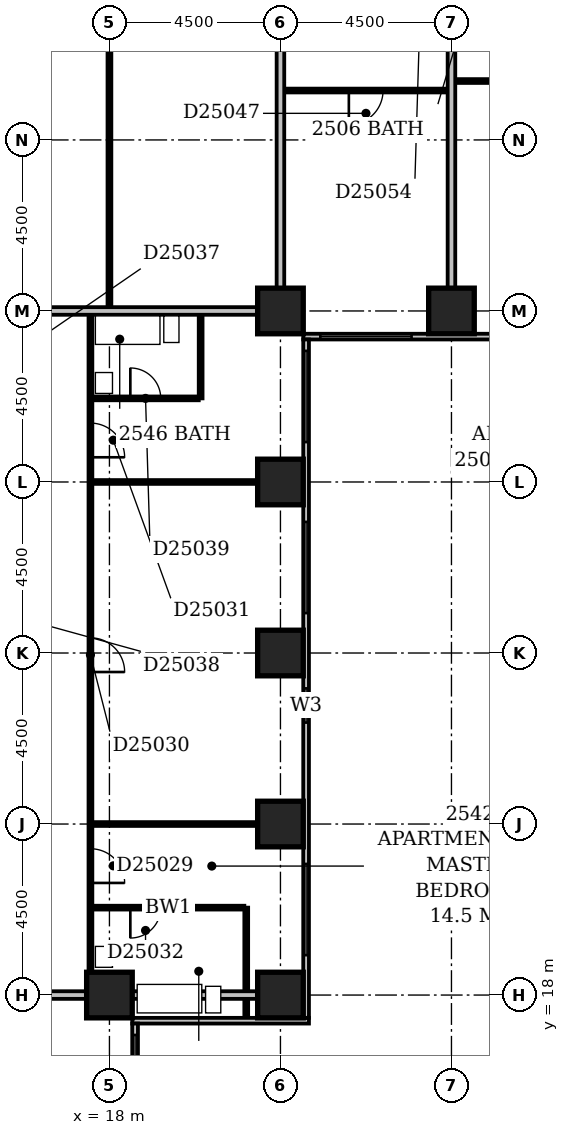
"""IFC4 building model, lengths in metres.
Left out: names, types, materials, properties, quantities, classifications, styles, units other than length and angle.
Written with IfcOpenShell. Run it as: python <this file> out.ifc"""

import sys

from ifc_helpers import new_model, si_unit, direction, frame, frame_2d, origin, origin_2d, place, context, subcontext, project, spatial, rectangle, extrude, element, fill, save


model = new_model("IFC4")
c1 = context("Model", 3, precision=1e-05, world=origin(), true_north=direction((0.0, 1.0)))
c2 = subcontext(c1, "Body", "Model", "MODEL_VIEW")
j1 = project(units=[si_unit("LENGTHUNIT", "METRE"), si_unit("PLANEANGLEUNIT", "RADIAN")], contexts=[c1])
p1 = place(None, origin())
s1 = spatial("IfcSite", under=j1, at=p1, CompositionType="ELEMENT")
p2 = place(p1, origin())
s2 = spatial("IfcBuilding", under=s1, at=p2, CompositionType="ELEMENT")
p3 = place(p2, frame((0.0, 0.0, 101.0)))
s3 = spatial("IfcBuildingStorey", under=s2, at=p3, CompositionType="ELEMENT", Elevation=101.0)
for number, where, z_axis, x_axis in (
    (1, (18.0, 18.0, -0.3), (0.0, 0.0, 1.0), (1.0, 0.0, 0.0)),
    (2, (22.5, 18.0, -0.3), (0.0, 0.0, 1.0), (1.0, 0.0, 0.0)),
    (3, (22.5, 22.5, -0.3), (0.0, 0.0, 1.0), (1.0, 0.0, 0.0)),
    (4, (22.5, 27.0, -0.3), (0.0, 0.0, 1.0), (1.0, 0.0, 0.0)),
    (5, (22.5, 31.5, -0.3), (0.0, 0.0, 1.0), (1.0, 0.0, 0.0)),
    (6, (22.5, 36.0, -0.3), (0.0, 0.0, 1.0), (1.0, 0.0, 0.0)),
    (7, (27.0, 36.0, -0.3), (0.0, 0.0, 1.0), (1.0, 0.0, 0.0)),
):
    element("IfcColumn", number, at=place(p3, frame(where, z_axis=z_axis, x_axis=x_axis)), inside=s3, PredefinedType="COLUMN", context=c2, shape_type="SweptSolid", body=[
        extrude(rectangle(XDim=1.2, YDim=1.2, at=origin_2d()), origin(), (0.0, 0.0, 1.0), 3.6),
    ])
p4 = place(p3, frame((18.675, 8.4, 0.0), z_axis=(0.0, 0.0, 1.0), x_axis=(0.0, 1.0, 0.0)))
e8 = element("IfcWall", 8, at=p4, inside=s3, PredefinedType="STANDARD", context=c2, shape_type="SweptSolid", body=[
    extrude(rectangle(XDim=8.85, YDim=0.15, at=frame_2d((4.425, 0.0))), origin(), (0.0, 0.0, 1.0), 2.7),
])
p5 = place(p4, frame((1.535, 0.0, 0.6)))
e9 = element("IfcOpeningElement", 9, at=p5, cuts=e8, PredefinedType="OPENING", context=c2, shape_type="SweptSolid", body=[
    extrude(rectangle(XDim=1.2, YDim=1.8, at=frame_2d((0.6, 0.9))), frame((0.0, 0.087, 0.0), z_axis=(0.0, -1.0, 0.0), x_axis=(1.0, 0.0, 0.0)), (0.0, 0.0, 1.0), 0.174),
])
p6 = place(p4, frame((6.15, 0.0, 0.6)))
e10 = element("IfcOpeningElement", 10, at=p6, cuts=e8, PredefinedType="OPENING", context=c2, shape_type="SweptSolid", body=[
    extrude(rectangle(XDim=2.4, YDim=1.8, at=frame_2d((1.2, 0.9))), frame((0.0, 0.087, 0.0), z_axis=(0.0, -1.0, 0.0), x_axis=(1.0, 0.0, 0.0)), (0.0, 0.0, 1.0), 0.174),
])
p7 = place(p3, frame((18.6, 17.325, 0.0), z_axis=(0.0, 0.0, 1.0), x_axis=(1.0, 0.0, 0.0)))
e11 = element("IfcWall", 11, at=p7, inside=s3, PredefinedType="STANDARD", context=c2, shape_type="SweptSolid", body=[
    extrude(rectangle(XDim=4.65, YDim=0.15, at=frame_2d((2.325, 0.0))), origin(), (0.0, 0.0, 1.0), 2.7),
])
p8 = place(p3, frame((23.175, 17.4, 0.0), z_axis=(0.0, 0.0, 1.0), x_axis=(0.0, 1.0, 0.0)))
e12 = element("IfcWall", 12, at=p8, inside=s3, PredefinedType="STANDARD", context=c2, shape_type="SweptSolid", body=[
    extrude(rectangle(XDim=17.85, YDim=0.15, at=frame_2d((8.925, 0.0))), origin(), (0.0, 0.0, 1.0), 2.7),
])
p9 = place(p8, frame((1.65, 0.0, 0.6)))
e13 = element("IfcOpeningElement", 13, at=p9, cuts=e12, PredefinedType="OPENING", context=c2, shape_type="SweptSolid", body=[
    extrude(rectangle(XDim=2.4, YDim=1.8, at=frame_2d((1.2, 0.9))), frame((0.0, 0.087, 0.0), z_axis=(0.0, -1.0, 0.0), x_axis=(1.0, 0.0, 0.0)), (0.0, 0.0, 1.0), 0.174),
])
p10 = place(p8, frame((7.769, 0.0, 0.6)))
e14 = element("IfcOpeningElement", 14, at=p10, cuts=e12, PredefinedType="OPENING", context=c2, shape_type="SweptSolid", body=[
    extrude(rectangle(XDim=0.9, YDim=1.8, at=frame_2d((0.45, 0.9))), frame((0.0, 0.087, 0.0), z_axis=(0.0, -1.0, 0.0), x_axis=(1.0, 0.0, 0.0)), (0.0, 0.0, 1.0), 0.174),
])
p11 = place(p8, frame((10.65, 0.0, 0.6)))
e15 = element("IfcOpeningElement", 15, at=p11, cuts=e12, PredefinedType="OPENING", context=c2, shape_type="SweptSolid", body=[
    extrude(rectangle(XDim=2.4, YDim=1.8, at=frame_2d((1.2, 0.9))), frame((0.0, 0.087, 0.0), z_axis=(0.0, -1.0, 0.0), x_axis=(1.0, 0.0, 0.0)), (0.0, 0.0, 1.0), 0.174),
])
p12 = place(p8, frame((15.15, 0.0, 0.6)))
e16 = element("IfcOpeningElement", 16, at=p12, cuts=e12, PredefinedType="OPENING", context=c2, shape_type="SweptSolid", body=[
    extrude(rectangle(XDim=2.4, YDim=1.8, at=frame_2d((1.2, 0.9))), frame((0.0, 0.087, 0.0), z_axis=(0.0, -1.0, 0.0), x_axis=(1.0, 0.0, 0.0)), (0.0, 0.0, 1.0), 0.174),
])
p13 = place(p3, frame((23.1, 35.325, 0.0), z_axis=(0.0, 0.0, 1.0), x_axis=(1.0, 0.0, 0.0)))
e17 = element("IfcWall", 17, at=p13, inside=s3, PredefinedType="STANDARD", context=c2, shape_type="SweptSolid", body=[
    extrude(rectangle(XDim=45.15, YDim=0.15, at=frame_2d((22.575, 0.0))), origin(), (0.0, 0.0, 1.0), 2.7),
])
p14 = place(p13, frame((0.45, 0.0, 0.6)))
e18 = element("IfcOpeningElement", 18, at=p14, cuts=e17, PredefinedType="OPENING", context=c2, shape_type="SweptSolid", body=[
    extrude(rectangle(XDim=2.4, YDim=1.8, at=frame_2d((1.2, 0.9))), frame((0.0, 0.087, 0.0), z_axis=(0.0, -1.0, 0.0), x_axis=(1.0, 0.0, 0.0)), (0.0, 0.0, 1.0), 0.174),
])
p15 = place(p13, frame((5.728, 0.0, 0.6)))
e19 = element("IfcOpeningElement", 19, at=p15, cuts=e17, PredefinedType="OPENING", context=c2, shape_type="SweptSolid", body=[
    extrude(rectangle(XDim=1.8, YDim=1.8, at=frame_2d((0.9, 0.9))), frame((0.0, 0.087, 0.0), z_axis=(0.0, -1.0, 0.0), x_axis=(1.0, 0.0, 0.0)), (0.0, 0.0, 1.0), 0.174),
])
p16 = place(p13, frame((9.45, 0.0, 0.6)))
e20 = element("IfcOpeningElement", 20, at=p16, cuts=e17, PredefinedType="OPENING", context=c2, shape_type="SweptSolid", body=[
    extrude(rectangle(XDim=2.4, YDim=1.8, at=frame_2d((1.2, 0.9))), frame((0.0, 0.087, 0.0), z_axis=(0.0, -1.0, 0.0), x_axis=(1.0, 0.0, 0.0)), (0.0, 0.0, 1.0), 0.174),
])
p17 = place(p13, frame((13.95, 0.0, 0.6)))
e21 = element("IfcOpeningElement", 21, at=p17, cuts=e17, PredefinedType="OPENING", context=c2, shape_type="SweptSolid", body=[
    extrude(rectangle(XDim=2.4, YDim=1.8, at=frame_2d((1.2, 0.9))), frame((0.0, 0.087, 0.0), z_axis=(0.0, -1.0, 0.0), x_axis=(1.0, 0.0, 0.0)), (0.0, 0.0, 1.0), 0.174),
])
p18 = place(p13, frame((18.276, 0.0, 0.6)))
e22 = element("IfcOpeningElement", 22, at=p18, cuts=e17, PredefinedType="OPENING", context=c2, shape_type="SweptSolid", body=[
    extrude(rectangle(XDim=2.4, YDim=1.8, at=frame_2d((1.2, 0.9))), frame((0.0, 0.087, 0.0), z_axis=(0.0, -1.0, 0.0), x_axis=(1.0, 0.0, 0.0)), (0.0, 0.0, 1.0), 0.174),
])
p19 = place(p13, frame((22.95, 0.0, 0.6)))
e23 = element("IfcOpeningElement", 23, at=p19, cuts=e17, PredefinedType="OPENING", context=c2, shape_type="SweptSolid", body=[
    extrude(rectangle(XDim=2.4, YDim=1.8, at=frame_2d((1.2, 0.9))), frame((0.0, 0.087, 0.0), z_axis=(0.0, -1.0, 0.0), x_axis=(1.0, 0.0, 0.0)), (0.0, 0.0, 1.0), 0.174),
])
p20 = place(p13, frame((27.45, 0.0, 0.6)))
e24 = element("IfcOpeningElement", 24, at=p20, cuts=e17, PredefinedType="OPENING", context=c2, shape_type="SweptSolid", body=[
    extrude(rectangle(XDim=2.4, YDim=1.8, at=frame_2d((1.2, 0.9))), frame((0.0, 0.087, 0.0), z_axis=(0.0, -1.0, 0.0), x_axis=(1.0, 0.0, 0.0)), (0.0, 0.0, 1.0), 0.174),
])
p21 = place(p13, frame((33.921, 0.0, 0.6)))
e25 = element("IfcOpeningElement", 25, at=p21, cuts=e17, PredefinedType="OPENING", context=c2, shape_type="SweptSolid", body=[
    extrude(rectangle(XDim=0.6, YDim=1.8, at=frame_2d((0.3, 0.9))), frame((0.0, 0.087, 0.0), z_axis=(0.0, -1.0, 0.0), x_axis=(1.0, 0.0, 0.0)), (0.0, 0.0, 1.0), 0.174),
])
p22 = place(p13, frame((36.45, 0.0, 0.6)))
e26 = element("IfcOpeningElement", 26, at=p22, cuts=e17, PredefinedType="OPENING", context=c2, shape_type="SweptSolid", body=[
    extrude(rectangle(XDim=2.4, YDim=1.8, at=frame_2d((1.2, 0.9))), frame((0.0, 0.087, 0.0), z_axis=(0.0, -1.0, 0.0), x_axis=(1.0, 0.0, 0.0)), (0.0, 0.0, 1.0), 0.174),
])
p23 = place(p13, frame((40.95, 0.0, 0.6)))
e27 = element("IfcOpeningElement", 27, at=p23, cuts=e17, PredefinedType="OPENING", context=c2, shape_type="SweptSolid", body=[
    extrude(rectangle(XDim=2.4, YDim=1.8, at=frame_2d((1.2, 0.9))), frame((0.0, 0.087, 0.0), z_axis=(0.0, -1.0, 0.0), x_axis=(1.0, 0.0, 0.0)), (0.0, 0.0, 1.0), 0.174),
])
p24 = place(p3, frame((21.6, 17.4, 0.0), z_axis=(0.0, 0.0, 1.0), x_axis=(0.0, 1.0, 0.0)))
e28 = element("IfcWall", 28, at=p24, inside=s3, PredefinedType="PLUMBINGWALL", context=c2, shape_type="SweptSolid", body=[
    extrude(rectangle(XDim=2.9, YDim=0.1, at=frame_2d((1.45, 0.0))), origin(), (0.0, 0.0, 1.0), 3.3),
])
p25 = place(p3, frame((9.1, 18.0, 0.0), z_axis=(0.0, 0.0, 1.0), x_axis=(1.0, 0.0, 0.0)))
e29 = element("IfcWall", 29, at=p25, inside=s3, PredefinedType="PARTITIONING", context=c2, shape_type="SweptSolid", body=[
    extrude(rectangle(XDim=8.3, YDim=0.2, at=frame_2d((4.15, 0.0))), origin(), (0.0, 0.0, 1.0), 2.6),
])
p26 = place(p3, frame((18.6, 18.0, 0.0), z_axis=(0.0, 0.0, 1.0), x_axis=(1.0, 0.0, 0.0)))
e30 = element("IfcWall", 30, at=p26, inside=s3, PredefinedType="PARTITIONING", context=c2, shape_type="SweptSolid", body=[
    extrude(rectangle(XDim=3.3, YDim=0.2, at=frame_2d((1.65, 0.0))), origin(), (0.0, 0.0, 1.0), 2.7),
])
p27 = place(p3, frame((17.5, 18.1, 0.0), z_axis=(0.0, 0.0, 1.0), x_axis=(0.0, 1.0, 0.0)))
e31 = element("IfcWall", 31, at=p27, inside=s3, PredefinedType="PARTITIONING", context=c2, shape_type="SweptSolid", body=[
    extrude(rectangle(XDim=17.8, YDim=0.1, at=frame_2d((8.9, 0.0))), origin(), (0.0, 0.0, 1.0), 3.3),
])
p28 = place(p27, frame((2.85, 0.0, 0.0)))
e32 = element("IfcOpeningElement", 32, at=p28, cuts=e31, PredefinedType="OPENING", context=c2, shape_type="SweptSolid", body=[
    extrude(rectangle(XDim=0.9, YDim=2.1, at=frame_2d((0.45, 1.05))), frame((0.0, 0.062, 0.0), z_axis=(0.0, -1.0, 0.0), x_axis=(1.0, 0.0, 0.0)), (0.0, 0.0, 1.0), 0.124),
])
p29 = place(p27, frame((8.4, 0.0, 0.0)))
e33 = element("IfcOpeningElement", 33, at=p29, cuts=e31, PredefinedType="OPENING", context=c2, shape_type="SweptSolid", body=[
    extrude(rectangle(XDim=0.9, YDim=2.1, at=frame_2d((0.45, 1.05))), frame((0.0, 0.062, 0.0), z_axis=(0.0, -1.0, 0.0), x_axis=(1.0, 0.0, 0.0)), (0.0, 0.0, 1.0), 0.124),
])
p30 = place(p27, frame((14.05, 0.0, 0.0)))
e34 = element("IfcOpeningElement", 34, at=p30, cuts=e31, PredefinedType="OPENING", context=c2, shape_type="SweptSolid", body=[
    extrude(rectangle(XDim=0.9, YDim=2.1, at=frame_2d((0.45, 1.05))), frame((0.0, 0.062, 0.0), z_axis=(0.0, -1.0, 0.0), x_axis=(1.0, 0.0, 0.0)), (0.0, 0.0, 1.0), 0.124),
])
p31 = place(p3, frame((17.55, 20.3, 0.0), z_axis=(0.0, 0.0, 1.0), x_axis=(1.0, 0.0, 0.0)))
e35 = element("IfcWall", 35, at=p31, inside=s3, PredefinedType="PLUMBINGWALL", context=c2, shape_type="SweptSolid", body=[
    extrude(rectangle(XDim=4.0, YDim=0.1, at=frame_2d((2.0, 0.0))), origin(), (0.0, 0.0, 1.0), 3.3),
])
p32 = place(p31, frame((1.0, 0.0, 0.0)))
e36 = element("IfcOpeningElement", 36, at=p32, cuts=e35, PredefinedType="OPENING", context=c2, shape_type="SweptSolid", body=[
    extrude(rectangle(XDim=0.8, YDim=2.1, at=frame_2d((0.4, 1.05))), frame((0.0, 0.062, 0.0), z_axis=(0.0, -1.0, 0.0), x_axis=(1.0, 0.0, 0.0)), (0.0, 0.0, 1.0), 0.124),
])
for number, where, z_axis, x_axis in (
    (37, (17.55, 22.5, 0.0), (0.0, 0.0, 1.0), (1.0, 0.0, 0.0)),
    (38, (17.55, 31.5, 0.0), (0.0, 0.0, 1.0), (1.0, 0.0, 0.0)),
):
    element("IfcWall", number, at=place(p3, frame(where, z_axis=z_axis, x_axis=x_axis)), inside=s3, PredefinedType="PARTITIONING", context=c2, shape_type="SweptSolid", body=[
        extrude(rectangle(XDim=4.35, YDim=0.1, at=frame_2d((2.175, 0.0))), origin(), (0.0, 0.0, 1.0), 3.3),
    ])
p33 = place(p3, frame((17.55, 33.7, 0.0), z_axis=(0.0, 0.0, 1.0), x_axis=(1.0, 0.0, 0.0)))
e39 = element("IfcWall", 39, at=p33, inside=s3, PredefinedType="PLUMBINGWALL", context=c2, shape_type="SweptSolid", body=[
    extrude(rectangle(XDim=2.8, YDim=0.1, at=frame_2d((1.4, 0.0))), origin(), (0.0, 0.0, 1.0), 3.3),
])
p34 = place(p33, frame((1.0, 0.0, 0.0)))
e40 = element("IfcOpeningElement", 40, at=p34, cuts=e39, PredefinedType="OPENING", context=c2, shape_type="SweptSolid", body=[
    extrude(rectangle(XDim=0.8, YDim=2.1, at=frame_2d((0.4, 1.05))), frame((0.0, 0.062, 0.0), z_axis=(0.0, -1.0, 0.0), x_axis=(1.0, 0.0, 0.0)), (0.0, 0.0, 1.0), 0.124),
])
p35 = place(p3, frame((20.4, 33.7, 0.0), z_axis=(0.0, 0.0, 1.0), x_axis=(0.0, 1.0, 0.0)))
e41 = element("IfcWall", 41, at=p35, inside=s3, PredefinedType="PLUMBINGWALL", context=c2, shape_type="SweptSolid", body=[
    extrude(rectangle(XDim=2.2, YDim=0.1, at=frame_2d((1.1, 0.0))), origin(), (0.0, 0.0, 1.0), 3.3),
])
p36 = place(p3, frame((9.1, 36.0, 0.0), z_axis=(0.0, 0.0, 1.0), x_axis=(1.0, 0.0, 0.0)))
e42 = element("IfcWall", 42, at=p36, inside=s3, PredefinedType="PARTITIONING", context=c2, shape_type="SweptSolid", body=[
    extrude(rectangle(XDim=12.8, YDim=0.2, at=frame_2d((6.4, 0.0))), origin(), (0.0, 0.0, 1.0), 2.4),
])
p37 = place(p3, frame((18.0, 36.1, 0.0), z_axis=(0.0, 0.0, 1.0), x_axis=(0.0, 1.0, 0.0)))
e43 = element("IfcWall", 43, at=p37, inside=s3, PredefinedType="PARTITIONING", context=c2, shape_type="SweptSolid", body=[
    extrude(rectangle(XDim=13.3, YDim=0.1, at=frame_2d((6.65, 0.0))), origin(), (0.0, 0.0, 1.0), 3.3),
])
p38 = place(p3, frame((22.5, 36.6, 0.0), z_axis=(0.0, 0.0, 1.0), x_axis=(0.0, 1.0, 0.0)))
e44 = element("IfcWall", 44, at=p38, inside=s3, PredefinedType="PARTITIONING", context=c2, shape_type="SweptSolid", body=[
    extrude(rectangle(XDim=12.8, YDim=0.2, at=frame_2d((6.4, 0.0))), origin(), (0.0, 0.0, 1.0), 3.3),
])
p39 = place(p3, frame((27.0, 36.6, 0.0), z_axis=(0.0, 0.0, 1.0), x_axis=(0.0, 1.0, 0.0)))
e45 = element("IfcWall", 45, at=p39, inside=s3, PredefinedType="PARTITIONING", context=c2, shape_type="SweptSolid", body=[
    extrude(rectangle(XDim=12.8, YDim=0.2, at=frame_2d((6.4, 0.0))), origin(), (0.0, 0.0, 1.0), 2.6),
])
p40 = place(p3, frame((22.6, 41.8, 0.0), z_axis=(0.0, 0.0, 1.0), x_axis=(1.0, 0.0, 0.0)))
e46 = element("IfcWall", 46, at=p40, inside=s3, PredefinedType="PARTITIONING", context=c2, shape_type="SweptSolid", body=[
    extrude(rectangle(XDim=4.3, YDim=0.1, at=frame_2d((2.15, 0.0))), origin(), (0.0, 0.0, 1.0), 3.3),
])
p41 = place(p40, frame((1.7, 0.0, 0.0)))
e47 = element("IfcOpeningElement", 47, at=p41, cuts=e46, PredefinedType="OPENING", context=c2, shape_type="SweptSolid", body=[
    extrude(rectangle(XDim=0.9, YDim=2.1, at=frame_2d((0.45, 1.05))), frame((0.0, 0.062, 0.0), z_axis=(0.0, -1.0, 0.0), x_axis=(1.0, 0.0, 0.0)), (0.0, 0.0, 1.0), 0.124),
])
p42 = place(p3, frame((27.1, 42.05, 0.0), z_axis=(0.0, 0.0, 1.0), x_axis=(1.0, 0.0, 0.0)))
e48 = element("IfcWall", 48, at=p42, inside=s3, PredefinedType="PARTITIONING", context=c2, shape_type="SweptSolid", body=[
    extrude(rectangle(XDim=8.8, YDim=0.1, at=frame_2d((4.4, 0.0))), origin(), (0.0, 0.0, 1.0), 3.3),
])
p43 = place(p42, frame((1.7, 0.0, 0.0)))
e49 = element("IfcOpeningElement", 49, at=p43, cuts=e48, PredefinedType="OPENING", context=c2, shape_type="SweptSolid", body=[
    extrude(rectangle(XDim=0.9, YDim=2.1, at=frame_2d((0.45, 1.05))), frame((0.0, 0.062, 0.0), z_axis=(0.0, -1.0, 0.0), x_axis=(1.0, 0.0, 0.0)), (0.0, 0.0, 1.0), 0.124),
])
p44 = place(p42, frame((6.2, 0.0, 0.0)))
e50 = element("IfcOpeningElement", 50, at=p44, cuts=e48, PredefinedType="OPENING", context=c2, shape_type="SweptSolid", body=[
    extrude(rectangle(XDim=0.9, YDim=2.1, at=frame_2d((0.45, 1.05))), frame((0.0, 0.062, 0.0), z_axis=(0.0, -1.0, 0.0), x_axis=(1.0, 0.0, 0.0)), (0.0, 0.0, 1.0), 0.124),
])
p45 = place(p6, origin())
e51 = element("IfcWindow", 51, at=p45, inside=s3, PartitioningType="SINGLE_PANEL", PredefinedType="WINDOW", context=c2, shape_type="SweptSolid", body=[
    extrude(rectangle(XDim=2.4, YDim=1.8, at=frame_2d((1.2, 0.9))), frame((0.0, 0.03, 0.0), z_axis=(0.0, -1.0, 0.0), x_axis=(1.0, 0.0, 0.0)), (0.0, 0.0, 1.0), 0.06),
])
fill(e10, e51)
p46 = place(p9, origin())
e52 = element("IfcWindow", 52, at=p46, inside=s3, PartitioningType="SINGLE_PANEL", PredefinedType="WINDOW", context=c2, shape_type="SweptSolid", body=[
    extrude(rectangle(XDim=2.4, YDim=1.8, at=frame_2d((1.2, 0.9))), frame((0.0, 0.03, 0.0), z_axis=(0.0, -1.0, 0.0), x_axis=(1.0, 0.0, 0.0)), (0.0, 0.0, 1.0), 0.06),
])
fill(e13, e52)
p47 = place(p10, origin())
e53 = element("IfcWindow", 53, at=p47, inside=s3, PartitioningType="SINGLE_PANEL", PredefinedType="WINDOW", context=c2, shape_type="SweptSolid", body=[
    extrude(rectangle(XDim=0.9, YDim=1.8, at=frame_2d((0.45, 0.9))), frame((0.0, 0.03, 0.0), z_axis=(0.0, -1.0, 0.0), x_axis=(1.0, 0.0, 0.0)), (0.0, 0.0, 1.0), 0.06),
])
fill(e14, e53)
p48 = place(p11, origin())
e54 = element("IfcWindow", 54, at=p48, inside=s3, PartitioningType="SINGLE_PANEL", PredefinedType="WINDOW", context=c2, shape_type="SweptSolid", body=[
    extrude(rectangle(XDim=2.4, YDim=1.8, at=frame_2d((1.2, 0.9))), frame((0.0, 0.03, 0.0), z_axis=(0.0, -1.0, 0.0), x_axis=(1.0, 0.0, 0.0)), (0.0, 0.0, 1.0), 0.06),
])
fill(e15, e54)
p49 = place(p12, origin())
e55 = element("IfcWindow", 55, at=p49, inside=s3, PartitioningType="SINGLE_PANEL", PredefinedType="WINDOW", context=c2, shape_type="SweptSolid", body=[
    extrude(rectangle(XDim=2.4, YDim=1.8, at=frame_2d((1.2, 0.9))), frame((0.0, 0.03, 0.0), z_axis=(0.0, -1.0, 0.0), x_axis=(1.0, 0.0, 0.0)), (0.0, 0.0, 1.0), 0.06),
])
fill(e16, e55)
p50 = place(p14, origin())
e56 = element("IfcWindow", 56, at=p50, inside=s3, PartitioningType="SINGLE_PANEL", PredefinedType="WINDOW", context=c2, shape_type="SweptSolid", body=[
    extrude(rectangle(XDim=2.4, YDim=1.8, at=frame_2d((1.2, 0.9))), frame((0.0, 0.03, 0.0), z_axis=(0.0, -1.0, 0.0), x_axis=(1.0, 0.0, 0.0)), (0.0, 0.0, 1.0), 0.06),
])
fill(e18, e56)
p51 = place(p28, frame((0.9, 0.0, 0.0), z_axis=(0.0, 0.0, 1.0), x_axis=(-1.0, 0.0, 0.0)))
e57 = element("IfcDoor", 57, at=p51, inside=s3, OperationType="SINGLE_SWING_RIGHT", PredefinedType="DOOR", context=c2, shape_type="SweptSolid", body=[
    extrude(rectangle(XDim=0.9, YDim=2.1, at=frame_2d((0.45, 1.05))), frame((0.0, 0.025, 0.0), z_axis=(0.0, -1.0, 0.0), x_axis=(1.0, 0.0, 0.0)), (0.0, 0.0, 1.0), 0.05),
])
fill(e32, e57)
p52 = place(p29, frame((0.9, 0.0, 0.0), z_axis=(0.0, 0.0, 1.0), x_axis=(-1.0, 0.0, 0.0)))
e58 = element("IfcDoor", 58, at=p52, inside=s3, OperationType="SINGLE_SWING_RIGHT", PredefinedType="DOOR", context=c2, shape_type="SweptSolid", body=[
    extrude(rectangle(XDim=0.9, YDim=2.1, at=frame_2d((0.45, 1.05))), frame((0.0, 0.025, 0.0), z_axis=(0.0, -1.0, 0.0), x_axis=(1.0, 0.0, 0.0)), (0.0, 0.0, 1.0), 0.05),
])
fill(e33, e58)
p53 = place(p30, frame((0.9, 0.0, 0.0), z_axis=(0.0, 0.0, 1.0), x_axis=(-1.0, 0.0, 0.0)))
e59 = element("IfcDoor", 59, at=p53, inside=s3, OperationType="SINGLE_SWING_RIGHT", PredefinedType="DOOR", context=c2, shape_type="SweptSolid", body=[
    extrude(rectangle(XDim=0.9, YDim=2.1, at=frame_2d((0.45, 1.05))), frame((0.0, 0.025, 0.0), z_axis=(0.0, -1.0, 0.0), x_axis=(1.0, 0.0, 0.0)), (0.0, 0.0, 1.0), 0.05),
])
fill(e34, e59)
p54 = place(p32, frame((0.8, 0.0, 0.0), z_axis=(0.0, 0.0, 1.0), x_axis=(-1.0, 0.0, 0.0)))
e60 = element("IfcDoor", 60, at=p54, inside=s3, OperationType="SINGLE_SWING_RIGHT", PredefinedType="DOOR", context=c2, shape_type="SweptSolid", body=[
    extrude(rectangle(XDim=0.8, YDim=2.1, at=frame_2d((0.4, 1.05))), frame((0.0, 0.025, 0.0), z_axis=(0.0, -1.0, 0.0), x_axis=(1.0, 0.0, 0.0)), (0.0, 0.0, 1.0), 0.05),
])
fill(e36, e60)
p55 = place(p34, origin())
e61 = element("IfcDoor", 61, at=p55, inside=s3, OperationType="SINGLE_SWING_LEFT", PredefinedType="DOOR", context=c2, shape_type="SweptSolid", body=[
    extrude(rectangle(XDim=0.8, YDim=2.1, at=frame_2d((0.4, 1.05))), frame((0.0, 0.025, 0.0), z_axis=(0.0, -1.0, 0.0), x_axis=(1.0, 0.0, 0.0)), (0.0, 0.0, 1.0), 0.05),
])
fill(e40, e61)
p56 = place(p41, frame((0.9, 0.0, 0.0), z_axis=(0.0, 0.0, 1.0), x_axis=(-1.0, 0.0, 0.0)))
e62 = element("IfcDoor", 62, at=p56, inside=s3, OperationType="SINGLE_SWING_RIGHT", PredefinedType="DOOR", context=c2, shape_type="SweptSolid", body=[
    extrude(rectangle(XDim=0.9, YDim=2.1, at=frame_2d((0.45, 1.05))), frame((0.0, 0.025, 0.0), z_axis=(0.0, -1.0, 0.0), x_axis=(1.0, 0.0, 0.0)), (0.0, 0.0, 1.0), 0.05),
])
fill(e47, e62)
save(model, sys.argv[1])
